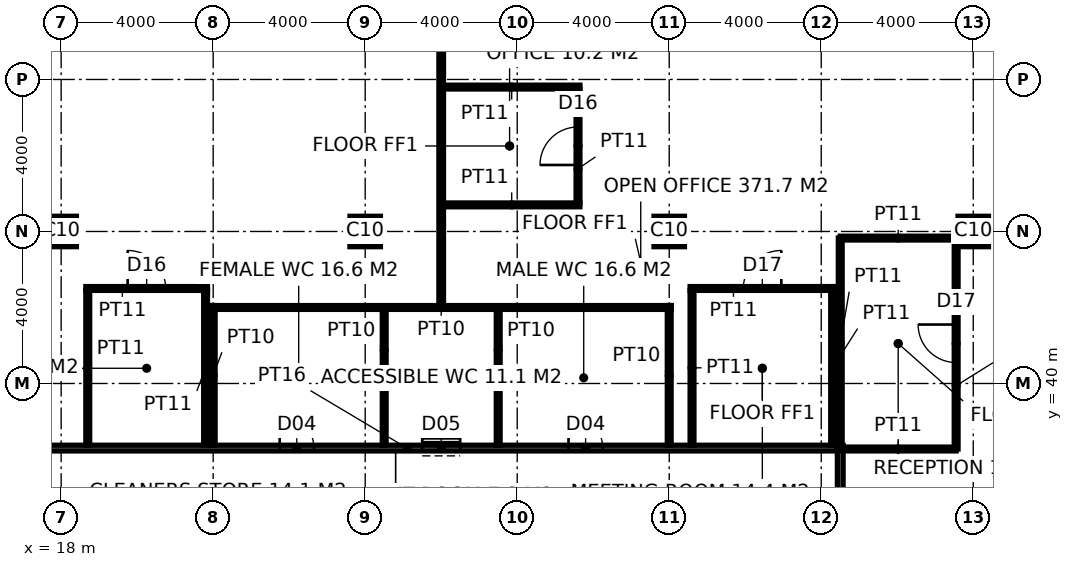
"""IFC4 building model, lengths in metres.
Left out: names, types, materials, properties, quantities, classifications, styles, units other than length and angle.
Written with IfcOpenShell. Run it as: python <this file> out.ifc"""

import sys

from ifc_helpers import new_model, si_unit, direction, frame, frame_2d, origin, origin_2d, place, context, subcontext, project, spatial, rectangle, hollow_rectangle, extrude, element, fill, save


model = new_model("IFC4")
c1 = context("Model", 3, precision=1e-05, world=origin(), true_north=direction((0.0, 1.0)))
c2 = subcontext(c1, "Body", "Model", "MODEL_VIEW")
j1 = project(units=[si_unit("LENGTHUNIT", "METRE"), si_unit("PLANEANGLEUNIT", "RADIAN")], contexts=[c1])
p1 = place(None, origin())
s1 = spatial("IfcSite", under=j1, at=p1, CompositionType="ELEMENT")
p2 = place(p1, origin())
s2 = spatial("IfcBuilding", under=s1, at=p2, CompositionType="ELEMENT")
p3 = place(p2, frame((0.0, 0.0, 234.2)))
s3 = spatial("IfcBuildingStorey", under=s2, at=p3, CompositionType="ELEMENT", Elevation=234.2)
for number, where, z_axis, x_axis in (
    (1, (18.0, 44.0, 0.0), (0.0, 0.0, 1.0), (1.0, 0.0, 0.0)),
    (2, (26.0, 44.0, 0.0), (0.0, 0.0, 1.0), (1.0, 0.0, 0.0)),
    (3, (34.0, 44.0, 0.0), (0.0, 0.0, 1.0), (1.0, 0.0, 0.0)),
    (4, (42.0, 44.0, 0.0), (0.0, 0.0, 1.0), (1.0, 0.0, 0.0)),
):
    element("IfcColumn", number, at=place(p3, frame(where, z_axis=z_axis, x_axis=x_axis)), inside=s3, PredefinedType="COLUMN", context=c2, shape_type="SweptSolid", body=[
        extrude(hollow_rectangle(XDim=0.8, YDim=0.8, WallThickness=0.1, at=origin_2d()), origin(), (0.0, 0.0, 1.0), 4.0),
    ])
p4 = place(p3, frame((38.5, 15.625, 0.0), z_axis=(0.0, 0.0, 1.0), x_axis=(0.0, 1.0, 0.0)))
e5 = element("IfcWall", 5, at=p4, inside=s3, PredefinedType="PARTITIONING", context=c2, shape_type="SweptSolid", body=[
    extrude(rectangle(XDim=22.75, YDim=0.15, at=frame_2d((11.375, 0.0))), origin(), (0.0, 0.0, 1.0), 2.65),
])
p5 = place(p4, frame((6.974, 0.0, 0.0)))
e6 = element("IfcOpeningElement", 6, at=p5, cuts=e5, PredefinedType="OPENING", context=c2, shape_type="SweptSolid", body=[
    extrude(rectangle(XDim=1.8, YDim=2.4, at=frame_2d((0.9, 1.2))), frame((0.0, 0.085, 0.0), z_axis=(0.0, -1.0, 0.0), x_axis=(1.0, 0.0, 0.0)), (0.0, 0.0, 1.0), 0.17),
])
p6 = place(p4, frame((18.226, 0.0, 0.0)))
e7 = element("IfcOpeningElement", 7, at=p6, cuts=e5, PredefinedType="OPENING", context=c2, shape_type="SweptSolid", body=[
    extrude(rectangle(XDim=1.8, YDim=2.4, at=frame_2d((0.9, 1.2))), frame((0.0, 0.085, 0.0), z_axis=(0.0, -1.0, 0.0), x_axis=(1.0, 0.0, 0.0)), (0.0, 0.0, 1.0), 0.17),
])
p7 = place(p3, frame((15.775, 38.3, 0.0), z_axis=(0.0, 0.0, 1.0), x_axis=(1.0, 0.0, 0.0)))
e8 = element("IfcWall", 8, at=p7, inside=s3, PredefinedType="PARTITIONING", context=c2, shape_type="SweptSolid", body=[
    extrude(rectangle(XDim=22.65, YDim=0.15, at=frame_2d((11.325, 0.0))), origin(), (0.0, 0.0, 1.0), 3.85),
])
p8 = place(p7, frame((7.975, 0.0, 0.0)))
e9 = element("IfcOpeningElement", 9, at=p8, cuts=e8, PredefinedType="OPENING", context=c2, shape_type="SweptSolid", body=[
    extrude(rectangle(XDim=0.9, YDim=2.1, at=frame_2d((0.45, 1.05))), frame((0.0, 0.085, 0.0), z_axis=(0.0, -1.0, 0.0), x_axis=(1.0, 0.0, 0.0)), (0.0, 0.0, 1.0), 0.17),
])
p9 = place(p7, frame((11.725, 0.0, 0.0)))
e10 = element("IfcOpeningElement", 10, at=p9, cuts=e8, PredefinedType="OPENING", context=c2, shape_type="SweptSolid", body=[
    extrude(rectangle(XDim=1.0, YDim=2.1, at=frame_2d((0.5, 1.05))), frame((0.0, 0.085, 0.0), z_axis=(0.0, -1.0, 0.0), x_axis=(1.0, 0.0, 0.0)), (0.0, 0.0, 1.0), 0.17),
])
p10 = place(p7, frame((15.575, 0.0, 0.0)))
e11 = element("IfcOpeningElement", 11, at=p10, cuts=e8, PredefinedType="OPENING", context=c2, shape_type="SweptSolid", body=[
    extrude(rectangle(XDim=0.9, YDim=2.1, at=frame_2d((0.45, 1.05))), frame((0.0, 0.085, 0.0), z_axis=(0.0, -1.0, 0.0), x_axis=(1.0, 0.0, 0.0)), (0.0, 0.0, 1.0), 0.17),
])
for number, where, z_axis, x_axis in (
    (12, (22.0, 38.375, 0.0), (0.0, 0.0, 1.0), (0.0, 1.0, 0.0)),
    (13, (34.0, 38.375, 0.0), (0.0, 0.0, 1.0), (0.0, 1.0, 0.0)),
):
    element("IfcWall", number, at=place(p3, frame(where, z_axis=z_axis, x_axis=x_axis)), inside=s3, PredefinedType="PARTITIONING", context=c2, shape_type="SweptSolid", body=[
        extrude(rectangle(XDim=3.675, YDim=0.1, at=frame_2d((1.837, 0.0))), origin(), (0.0, 0.0, 1.0), 2.65),
    ])
p11 = place(p3, frame((21.95, 42.0, 0.0), z_axis=(0.0, 0.0, 1.0), x_axis=(1.0, 0.0, 0.0)))
e14 = element("IfcWall", 14, at=p11, inside=s3, PredefinedType="PARTITIONING", context=c2, shape_type="SweptSolid", body=[
    extrude(rectangle(XDim=12.1, YDim=0.1, at=frame_2d((6.05, 0.0))), origin(), (0.0, 0.0, 1.0), 3.85),
])
for number, where, z_axis, x_axis in (
    (15, (26.5, 38.375, 0.0), (0.0, 0.0, 1.0), (0.0, 1.0, 0.0)),
    (16, (29.5, 38.375, 0.0), (0.0, 0.0, 1.0), (0.0, 1.0, 0.0)),
):
    element("IfcWall", number, at=place(p3, frame(where, z_axis=z_axis, x_axis=x_axis)), inside=s3, PredefinedType="PARTITIONING", context=c2, shape_type="SweptSolid", body=[
        extrude(rectangle(XDim=3.575, YDim=0.1, at=frame_2d((1.788, 0.0))), origin(), (0.0, 0.0, 1.0), 2.65),
    ])
p12 = place(p3, frame((28.0, 42.05, 0.0), z_axis=(0.0, 0.0, 1.0), x_axis=(0.0, 1.0, 0.0)))
e17 = element("IfcWall", 17, at=p12, inside=s3, PredefinedType="PARTITIONING", context=c2, shape_type="SweptSolid", body=[
    extrude(rectangle(XDim=13.65, YDim=0.12, at=frame_2d((6.825, 0.0))), origin(), (0.0, 0.0, 1.0), 3.85),
])
p13 = place(p3, frame((18.65, 42.5, 0.0), z_axis=(0.0, 0.0, 1.0), x_axis=(1.0, 0.0, 0.0)))
e18 = element("IfcWall", 18, at=p13, inside=s3, PredefinedType="PARTITIONING", context=c2, shape_type="SweptSolid", body=[
    extrude(rectangle(XDim=3.2, YDim=0.1, at=frame_2d((1.6, 0.0))), origin(), (0.0, 0.0, 1.0), 3.85),
])
p14 = place(p13, frame((1.1, 0.0, 0.0)))
e19 = element("IfcOpeningElement", 19, at=p14, cuts=e18, PredefinedType="OPENING", context=c2, shape_type="SweptSolid", body=[
    extrude(rectangle(XDim=1.0, YDim=2.2, at=frame_2d((0.5, 1.1))), frame((0.0, 0.06, 0.0), z_axis=(0.0, -1.0, 0.0), x_axis=(1.0, 0.0, 0.0)), (0.0, 0.0, 1.0), 0.12),
])
p15 = place(p3, frame((34.55, 42.5, 0.0), z_axis=(0.0, 0.0, 1.0), x_axis=(1.0, 0.0, 0.0)))
e20 = element("IfcWall", 20, at=p15, inside=s3, PredefinedType="PARTITIONING", context=c2, shape_type="SweptSolid", body=[
    extrude(rectangle(XDim=3.8, YDim=0.1, at=frame_2d((1.9, 0.0))), origin(), (0.0, 0.0, 1.0), 3.85),
])
p16 = place(p15, frame((1.4, 0.0, 0.0)))
e21 = element("IfcOpeningElement", 21, at=p16, cuts=e20, PredefinedType="OPENING", context=c2, shape_type="SweptSolid", body=[
    extrude(rectangle(XDim=1.0, YDim=2.2, at=frame_2d((0.5, 1.1))), frame((0.0, 0.06, 0.0), z_axis=(0.0, -1.0, 0.0), x_axis=(1.0, 0.0, 0.0)), (0.0, 0.0, 1.0), 0.12),
])
for number, where, z_axis, x_axis in (
    (22, (28.06, 44.7, 0.0), (0.0, 0.0, 1.0), (1.0, 0.0, 0.0)),
    (23, (28.06, 47.8, 0.0), (0.0, 0.0, 1.0), (1.0, 0.0, 0.0)),
):
    element("IfcWall", number, at=place(p3, frame(where, z_axis=z_axis, x_axis=x_axis)), inside=s3, PredefinedType="PARTITIONING", context=c2, shape_type="SweptSolid", body=[
        extrude(rectangle(XDim=3.59, YDim=0.1, at=frame_2d((1.795, 0.0))), origin(), (0.0, 0.0, 1.0), 3.85),
    ])
p17 = place(p3, frame((18.7, 38.375, 0.0), z_axis=(0.0, 0.0, 1.0), x_axis=(0.0, 1.0, 0.0)))
e24 = element("IfcWall", 24, at=p17, inside=s3, PredefinedType="PARTITIONING", context=c2, shape_type="SweptSolid", body=[
    extrude(rectangle(XDim=4.075, YDim=0.1, at=frame_2d((2.038, 0.0))), origin(), (0.0, 0.0, 1.0), 3.85),
])
p18 = place(p3, frame((21.8, 38.375, 0.0), z_axis=(0.0, 0.0, 1.0), x_axis=(0.0, 1.0, 0.0)))
e25 = element("IfcWall", 25, at=p18, inside=s3, PredefinedType="PARTITIONING", context=c2, shape_type="SweptSolid", body=[
    extrude(rectangle(XDim=4.075, YDim=0.1, at=frame_2d((2.038, 0.0))), origin(), (0.0, 0.0, 1.0), 2.65),
])
p19 = place(p3, frame((31.6, 44.75, 0.0), z_axis=(0.0, 0.0, 1.0), x_axis=(0.0, 1.0, 0.0)))
e26 = element("IfcWall", 26, at=p19, inside=s3, PredefinedType="PARTITIONING", context=c2, shape_type="SweptSolid", body=[
    extrude(rectangle(XDim=3.0, YDim=0.1, at=frame_2d((1.5, 0.0))), origin(), (0.0, 0.0, 1.0), 3.85),
])
p20 = place(p19, frame((1.0, 0.0, 0.0)))
e27 = element("IfcOpeningElement", 27, at=p20, cuts=e26, PredefinedType="OPENING", context=c2, shape_type="SweptSolid", body=[
    extrude(rectangle(XDim=1.0, YDim=2.2, at=frame_2d((0.5, 1.1))), frame((0.0, 0.06, 0.0), z_axis=(0.0, -1.0, 0.0), x_axis=(1.0, 0.0, 0.0)), (0.0, 0.0, 1.0), 0.12),
])
for number, where, z_axis, x_axis in (
    (28, (34.6, 38.375, 0.0), (0.0, 0.0, 1.0), (0.0, 1.0, 0.0)),
    (29, (38.3, 38.375, 0.0), (0.0, 0.0, 1.0), (0.0, 1.0, 0.0)),
):
    element("IfcWall", number, at=place(p3, frame(where, z_axis=z_axis, x_axis=x_axis)), inside=s3, PredefinedType="PARTITIONING", context=c2, shape_type="SweptSolid", body=[
        extrude(rectangle(XDim=4.075, YDim=0.1, at=frame_2d((2.038, 0.0))), origin(), (0.0, 0.0, 1.0), 2.65),
    ])
p21 = place(p3, frame((38.5, 38.276, 0.0), z_axis=(0.0, 0.0, 1.0), x_axis=(1.0, 0.0, 0.0)))
e30 = element("IfcWall", 30, at=p21, inside=s3, PredefinedType="PARTITIONING", context=c2, shape_type="SweptSolid", body=[
    extrude(rectangle(XDim=3.05, YDim=0.1, at=frame_2d((1.525, 0.0))), origin(), (0.0, 0.0, 1.0), 3.85),
])
p22 = place(p3, frame((41.55, 38.276, 0.0), z_axis=(0.0, 0.0, 1.0), x_axis=(0.0, 1.0, 0.0)))
e31 = element("IfcWall", 31, at=p22, inside=s3, PredefinedType="PARTITIONING", context=c2, shape_type="SweptSolid", body=[
    extrude(rectangle(XDim=5.55, YDim=0.1, at=frame_2d((2.775, 0.0))), origin(), (0.0, 0.0, 1.0), 2.65),
])
p23 = place(p22, frame((2.275, 0.0, 0.0)))
e32 = element("IfcOpeningElement", 32, at=p23, cuts=e31, PredefinedType="OPENING", context=c2, shape_type="SweptSolid", body=[
    extrude(rectangle(XDim=1.0, YDim=2.2, at=frame_2d((0.5, 1.1))), frame((0.0, 0.06, 0.0), z_axis=(0.0, -1.0, 0.0), x_axis=(1.0, 0.0, 0.0)), (0.0, 0.0, 1.0), 0.12),
])
p24 = place(p3, frame((41.55, 43.826, 0.0), z_axis=(0.0, 0.0, 1.0), x_axis=(-1.0, 0.0, 0.0)))
e33 = element("IfcWall", 33, at=p24, inside=s3, PredefinedType="PARTITIONING", context=c2, shape_type="SweptSolid", body=[
    extrude(rectangle(XDim=3.05, YDim=0.1, at=frame_2d((1.525, 0.0))), origin(), (0.0, 0.0, 1.0), 2.95),
])
p25 = place(p3, frame((38.5, 43.826, 0.0), z_axis=(0.0, 0.0, 1.0), x_axis=(0.0, -1.0, 0.0)))
e34 = element("IfcWall", 34, at=p25, inside=s3, PredefinedType="PARTITIONING", context=c2, shape_type="SweptSolid", body=[
    extrude(rectangle(XDim=5.526, YDim=0.1, at=frame_2d((2.763, 0.0))), origin(), (0.0, 0.0, 1.0), 2.65),
])
p26 = place(p8, origin())
e35 = element("IfcDoor", 35, at=p26, inside=s3, OperationType="SINGLE_SWING_LEFT", PredefinedType="DOOR", context=c2, shape_type="SweptSolid", body=[
    extrude(rectangle(XDim=0.9, YDim=2.1, at=frame_2d((0.45, 1.05))), frame((0.0, 0.025, 0.0), z_axis=(0.0, -1.0, 0.0), x_axis=(1.0, 0.0, 0.0)), (0.0, 0.0, 1.0), 0.05),
])
fill(e9, e35)
p27 = place(p9, origin())
e36 = element("IfcDoor", 36, at=p27, inside=s3, OperationType="SLIDING_TO_LEFT", PredefinedType="DOOR", context=c2, shape_type="SweptSolid", body=[
    extrude(rectangle(XDim=1.0, YDim=2.1, at=frame_2d((0.5, 1.05))), frame((0.0, 0.025, 0.0), z_axis=(0.0, -1.0, 0.0), x_axis=(1.0, 0.0, 0.0)), (0.0, 0.0, 1.0), 0.05),
])
fill(e10, e36)
p28 = place(p10, origin())
e37 = element("IfcDoor", 37, at=p28, inside=s3, OperationType="SINGLE_SWING_LEFT", PredefinedType="DOOR", context=c2, shape_type="SweptSolid", body=[
    extrude(rectangle(XDim=0.9, YDim=2.1, at=frame_2d((0.45, 1.05))), frame((0.0, 0.025, 0.0), z_axis=(0.0, -1.0, 0.0), x_axis=(1.0, 0.0, 0.0)), (0.0, 0.0, 1.0), 0.05),
])
fill(e11, e37)
p29 = place(p14, origin())
e38 = element("IfcDoor", 38, at=p29, inside=s3, OperationType="SINGLE_SWING_LEFT", PredefinedType="DOOR", context=c2, shape_type="SweptSolid", body=[
    extrude(rectangle(XDim=1.0, YDim=2.2, at=frame_2d((0.5, 1.1))), frame((0.0, 0.025, 0.0), z_axis=(0.0, -1.0, 0.0), x_axis=(1.0, 0.0, 0.0)), (0.0, 0.0, 1.0), 0.05),
])
fill(e19, e38)
p30 = place(p16, origin())
e39 = element("IfcDoor", 39, at=p30, inside=s3, OperationType="SINGLE_SWING_RIGHT", PredefinedType="DOOR", context=c2, shape_type="SweptSolid", body=[
    extrude(rectangle(XDim=1.0, YDim=2.2, at=frame_2d((0.5, 1.1))), frame((0.0, 0.025, 0.0), z_axis=(0.0, -1.0, 0.0), x_axis=(1.0, 0.0, 0.0)), (0.0, 0.0, 1.0), 0.05),
])
fill(e21, e39)
p31 = place(p20, origin())
e40 = element("IfcDoor", 40, at=p31, inside=s3, OperationType="SINGLE_SWING_LEFT", PredefinedType="DOOR", context=c2, shape_type="SweptSolid", body=[
    extrude(rectangle(XDim=1.0, YDim=2.2, at=frame_2d((0.5, 1.1))), frame((0.0, 0.025, 0.0), z_axis=(0.0, -1.0, 0.0), x_axis=(1.0, 0.0, 0.0)), (0.0, 0.0, 1.0), 0.05),
])
fill(e27, e40)
p32 = place(p23, origin())
e41 = element("IfcDoor", 41, at=p32, inside=s3, OperationType="SINGLE_SWING_RIGHT", PredefinedType="DOOR", context=c2, shape_type="SweptSolid", body=[
    extrude(rectangle(XDim=1.0, YDim=2.2, at=frame_2d((0.5, 1.1))), frame((0.0, 0.025, 0.0), z_axis=(0.0, -1.0, 0.0), x_axis=(1.0, 0.0, 0.0)), (0.0, 0.0, 1.0), 0.05),
])
fill(e32, e41)
save(model, sys.argv[1])
